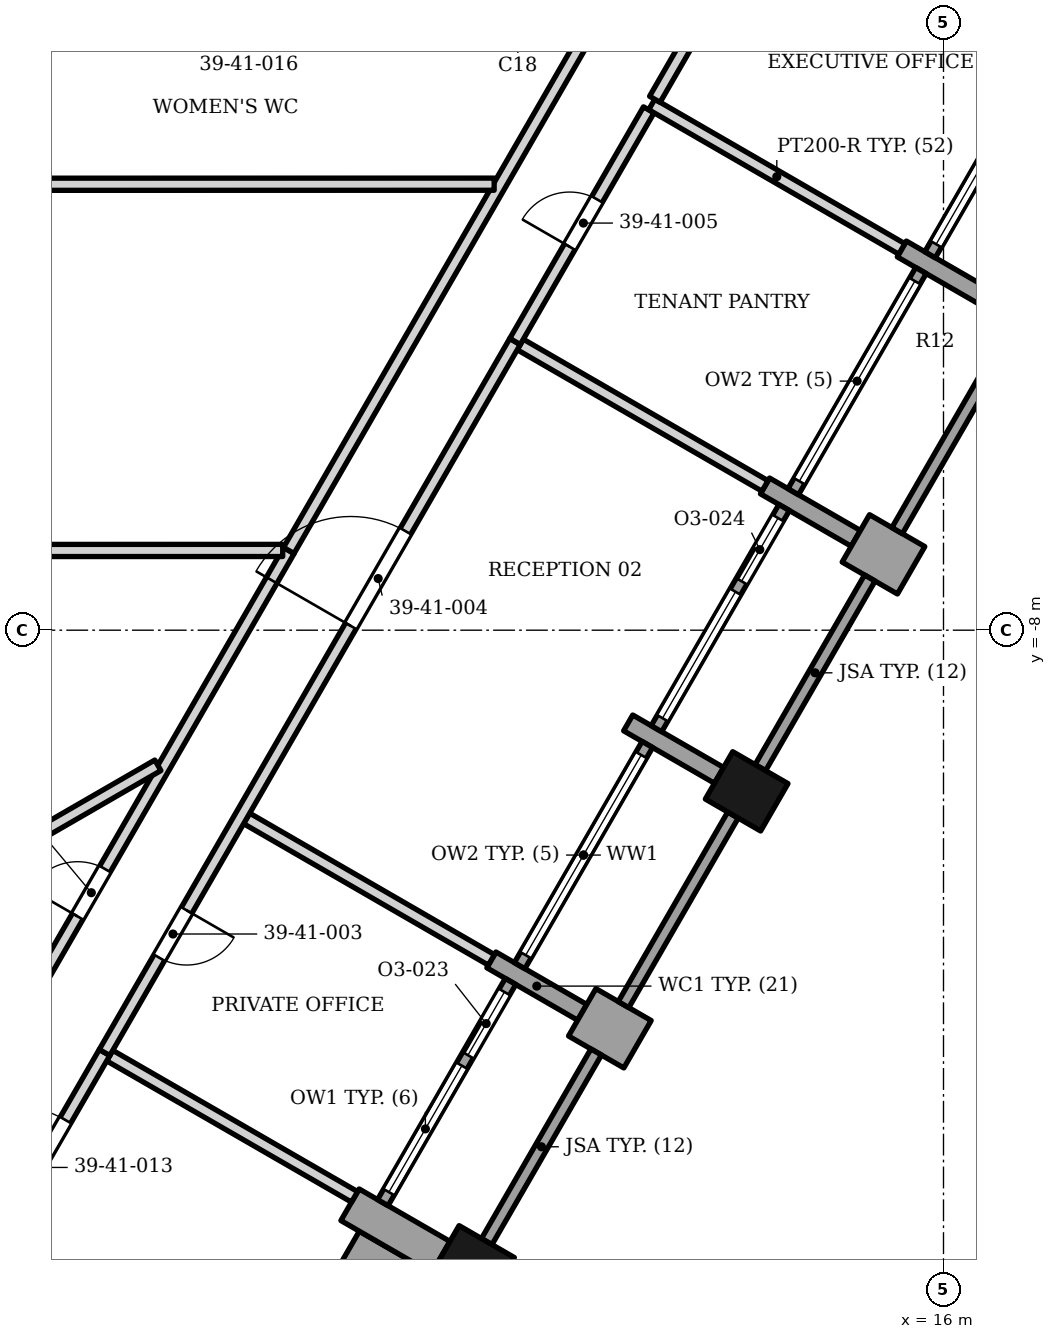
"""IFC4 building model, lengths in metres.
Left out: names, types, materials, properties, quantities, classifications, styles, units other than length and angle.
Written with IfcOpenShell. Run it as: python <this file> out.ifc"""

import sys

from ifc_helpers import new_model, si_unit, direction, frame, frame_2d, origin, origin_2d, place, context, subcontext, project, spatial, rectangle, extrude, element, fill, save


model = new_model("IFC4")
c1 = context("Model", 3, precision=1e-05, world=origin(), true_north=direction((0.0, 1.0)))
c2 = subcontext(c1, "Body", "Model", "MODEL_VIEW")
j1 = project(units=[si_unit("LENGTHUNIT", "METRE"), si_unit("PLANEANGLEUNIT", "RADIAN")], contexts=[c1])
p1 = place(None, origin())
s1 = spatial("IfcSite", under=j1, at=p1, CompositionType="ELEMENT")
p2 = place(p1, origin())
s2 = spatial("IfcBuilding", under=s1, at=p2, CompositionType="ELEMENT")
p3 = place(p2, frame((0.0, 0.0, 168.0)))
s3 = spatial("IfcBuildingStorey", under=s2, at=p3, CompositionType="ELEMENT", Elevation=168.0)
for number, where, z_axis, x_axis in (
    (1, (8.263, -18.444, 0.0), (0.0, 0.0, 1.0), (0.5, 0.866, 0.0)),
    (2, (12.763, -10.65, 0.0), (0.0, 0.0, 1.0), (0.5, 0.866, 0.0)),
):
    element("IfcColumn", number, at=place(p3, frame(where, z_axis=z_axis, x_axis=x_axis)), inside=s3, PredefinedType="COLUMN", context=c2, shape_type="SweptSolid", body=[
        extrude(rectangle(XDim=0.9, YDim=1.05, at=origin_2d()), origin(), (0.0, 0.0, 1.0), 3.9),
    ])
p4 = place(p3, frame((7.733, -18.311, 0.0), z_axis=(0.0, 0.0, 1.0), x_axis=(-0.866013532718, 0.500020560727, 0.0)))
e3 = element("IfcWall", 3, at=p4, inside=s3, PredefinedType="SOLIDWALL", context=c2, shape_type="SweptSolid", body=[
    extrude(rectangle(XDim=1.725, YDim=0.6, at=frame_2d((0.863, 0.0))), origin(), (0.0, 0.0, 1.0), 3.0),
])
p5 = place(p3, frame((10.968, -14.809, 0.0), z_axis=(0.0, 0.0, 1.0), x_axis=(-0.866030680601, 0.499990860175, 0.0)))
e4 = element("IfcWall", 4, at=p5, inside=s3, PredefinedType="SOLIDWALL", context=c2, shape_type="SweptSolid", body=[
    extrude(rectangle(XDim=1.05, YDim=0.9, at=frame_2d((0.525, 0.0))), origin(), (0.0, 0.0, 1.0), 3.0),
])
p6 = place(p3, frame((10.058, -14.284, 0.0), z_axis=(0.0, 0.0, 1.0), x_axis=(-0.866013532718, 0.500020560727, 0.0)))
e5 = element("IfcWall", 5, at=p6, inside=s3, PredefinedType="SOLIDWALL", context=c2, shape_type="SweptSolid", body=[
    extrude(rectangle(XDim=1.725, YDim=0.3, at=frame_2d((0.863, 0.0))), origin(), (0.0, 0.0, 1.0), 3.0),
])
p7 = place(p3, frame((12.308, -10.387, 0.0), z_axis=(0.0, 0.0, 1.0), x_axis=(-0.866074815912, 0.499914405916, 0.0)))
e6 = element("IfcWall", 6, at=p7, inside=s3, PredefinedType="SOLIDWALL", context=c2, shape_type="SweptSolid", body=[
    extrude(rectangle(XDim=1.725, YDim=0.3, at=frame_2d((0.862, 0.0))), origin(), (0.0, 0.0, 1.0), 3.0),
])
p8 = place(p3, frame((15.468, -7.015, 0.0), z_axis=(0.0, 0.0, 1.0), x_axis=(-0.866030680601, 0.499990860175, 0.0)))
e7 = element("IfcWall", 7, at=p8, inside=s3, PredefinedType="SOLIDWALL", context=c2, shape_type="SweptSolid", body=[
    extrude(rectangle(XDim=1.05, YDim=0.9, at=frame_2d((0.525, 0.0))), origin(), (0.0, 0.0, 1.0), 3.0),
])
p9 = place(p3, frame((14.558, -6.49, 0.0), z_axis=(0.0, 0.0, 1.0), x_axis=(-0.866013532718, 0.500020560727, 0.0)))
e8 = element("IfcWall", 8, at=p9, inside=s3, PredefinedType="SOLIDWALL", context=c2, shape_type="SweptSolid", body=[
    extrude(rectangle(XDim=1.725, YDim=0.3, at=frame_2d((0.863, 0.0))), origin(), (0.0, 0.0, 1.0), 3.0),
])
p10 = place(p3, frame((16.807, -2.592, 0.0), z_axis=(0.0, 0.0, 1.0), x_axis=(-0.865994550583, 0.500053435504, 0.0)))
e9 = element("IfcWall", 9, at=p10, inside=s3, PredefinedType="SOLIDWALL", context=c2, shape_type="SweptSolid", body=[
    extrude(rectangle(XDim=1.724, YDim=0.3, at=frame_2d((0.862, 0.0))), origin(), (0.0, 0.0, 1.0), 3.0),
])
p11 = place(p3, frame((8.488, -18.054, 0.0), z_axis=(0.0, 0.0, 1.0), x_axis=(0.500012057535, 0.866018442252, 0.0)))
e10 = element("IfcWall", 10, at=p11, inside=s3, PredefinedType="SOLIDWALL", context=c2, shape_type="SweptSolid", body=[
    extrude(rectangle(XDim=3.6, YDim=0.2, at=frame_2d((1.8, 0.0))), origin(), (0.0, 0.0, 1.0), 3.0),
])
p12 = place(p3, frame((6.779, -17.414, 0.0), z_axis=(0.0, 0.0, 1.0), x_axis=(0.500027713859, 0.866009402589, 0.0)))
e11 = element("IfcWall", 11, at=p12, inside=s3, PredefinedType="ELEMENTEDWALL", context=c2, shape_type="SweptSolid", body=[
    extrude(rectangle(XDim=4.2, YDim=0.2, at=frame_2d((2.1, 0.0))), origin(), (0.0, 0.0, 1.0), 3.0),
])
p13 = place(p12, frame((0.2, 0.0, 0.45)))
e12 = element("IfcOpeningElement", 12, at=p13, cuts=e11, PredefinedType="OPENING", context=c2, shape_type="SweptSolid", body=[
    extrude(rectangle(XDim=2.4, YDim=2.25, at=frame_2d((1.2, 1.125))), frame((0.0, 0.11, 0.0), z_axis=(0.0, -1.0, 0.0), x_axis=(1.0, 0.0, 0.0)), (0.0, 0.0, 1.0), 0.22),
])
p14 = place(p12, frame((2.8, 0.0, 0.0)))
e13 = element("IfcOpeningElement", 13, at=p14, cuts=e11, PredefinedType="OPENING", context=c2, shape_type="SweptSolid", body=[
    extrude(rectangle(XDim=1.2, YDim=2.7, at=frame_2d((0.6, 1.35))), frame((0.0, 0.11, 0.0), z_axis=(0.0, -1.0, 0.0), x_axis=(1.0, 0.0, 0.0)), (0.0, 0.0, 1.0), 0.22),
])
p15 = place(p3, frame((10.738, -14.157, 0.0), z_axis=(0.0, 0.0, 1.0), x_axis=(0.500012057535, 0.866018442252, 0.0)))
e14 = element("IfcWall", 14, at=p15, inside=s3, PredefinedType="SOLIDWALL", context=c2, shape_type="SweptSolid", body=[
    extrude(rectangle(XDim=3.6, YDim=0.2, at=frame_2d((1.8, 0.0))), origin(), (0.0, 0.0, 1.0), 3.0),
])
p16 = place(p3, frame((9.029, -13.517, 0.0), z_axis=(0.0, 0.0, 1.0), x_axis=(0.500002543286, 0.866023935413, 0.0)))
e15 = element("IfcWall", 15, at=p16, inside=s3, PredefinedType="ELEMENTEDWALL", context=c2, shape_type="SweptSolid", body=[
    extrude(rectangle(XDim=4.2, YDim=0.2, at=frame_2d((2.1, 0.0))), origin(), (0.0, 0.0, 1.0), 2.95),
])
p17 = place(p16, frame((0.2, 0.0, 0.45)))
e16 = element("IfcOpeningElement", 16, at=p17, cuts=e15, PredefinedType="OPENING", context=c2, shape_type="SweptSolid", body=[
    extrude(rectangle(XDim=3.8, YDim=2.25, at=frame_2d((1.9, 1.125))), frame((0.0, 0.11, 0.0), z_axis=(0.0, -1.0, 0.0), x_axis=(1.0, 0.0, 0.0)), (0.0, 0.0, 1.0), 0.22),
])
p18 = place(p3, frame((12.988, -10.26, 0.0), z_axis=(0.0, 0.0, 1.0), x_axis=(0.500012057535, 0.866018442252, 0.0)))
e17 = element("IfcWall", 17, at=p18, inside=s3, PredefinedType="SOLIDWALL", context=c2, shape_type="SweptSolid", body=[
    extrude(rectangle(XDim=3.6, YDim=0.2, at=frame_2d((1.8, 0.0))), origin(), (0.0, 0.0, 1.0), 3.0),
])
p19 = place(p3, frame((11.279, -9.62, 0.0), z_axis=(0.0, 0.0, 1.0), x_axis=(0.500027713859, 0.866009402589, 0.0)))
e18 = element("IfcWall", 18, at=p19, inside=s3, PredefinedType="ELEMENTEDWALL", context=c2, shape_type="SweptSolid", body=[
    extrude(rectangle(XDim=4.2, YDim=0.2, at=frame_2d((2.1, 0.0))), origin(), (0.0, 0.0, 1.0), 3.0),
])
p20 = place(p19, frame((0.2, 0.0, 0.45)))
e19 = element("IfcOpeningElement", 19, at=p20, cuts=e18, PredefinedType="OPENING", context=c2, shape_type="SweptSolid", body=[
    extrude(rectangle(XDim=2.4, YDim=2.25, at=frame_2d((1.2, 1.125))), frame((0.0, 0.11, 0.0), z_axis=(0.0, -1.0, 0.0), x_axis=(1.0, 0.0, 0.0)), (0.0, 0.0, 1.0), 0.22),
])
p21 = place(p19, frame((2.8, 0.0, 0.0)))
e20 = element("IfcOpeningElement", 20, at=p21, cuts=e18, PredefinedType="OPENING", context=c2, shape_type="SweptSolid", body=[
    extrude(rectangle(XDim=1.2, YDim=2.7, at=frame_2d((0.6, 1.35))), frame((0.0, 0.11, 0.0), z_axis=(0.0, -1.0, 0.0), x_axis=(1.0, 0.0, 0.0)), (0.0, 0.0, 1.0), 0.22),
])
p22 = place(p3, frame((15.238, -6.363, 0.0), z_axis=(0.0, 0.0, 1.0), x_axis=(0.500012057535, 0.866018442252, 0.0)))
e21 = element("IfcWall", 21, at=p22, inside=s3, PredefinedType="SOLIDWALL", context=c2, shape_type="SweptSolid", body=[
    extrude(rectangle(XDim=3.6, YDim=0.2, at=frame_2d((1.8, 0.0))), origin(), (0.0, 0.0, 1.0), 3.0),
])
p23 = place(p3, frame((13.529, -5.722, 0.0), z_axis=(0.0, 0.0, 1.0), x_axis=(0.500027713859, 0.866009402589, 0.0)))
e22 = element("IfcWall", 22, at=p23, inside=s3, PredefinedType="ELEMENTEDWALL", context=c2, shape_type="SweptSolid", body=[
    extrude(rectangle(XDim=4.2, YDim=0.2, at=frame_2d((2.1, 0.0))), origin(), (0.0, 0.0, 1.0), 3.0),
])
p24 = place(p23, frame((0.2, 0.0, 0.45)))
e23 = element("IfcOpeningElement", 23, at=p24, cuts=e22, PredefinedType="OPENING", context=c2, shape_type="SweptSolid", body=[
    extrude(rectangle(XDim=3.8, YDim=2.25, at=frame_2d((1.9, 1.125))), frame((0.0, 0.11, 0.0), z_axis=(0.0, -1.0, 0.0), x_axis=(1.0, 0.0, 0.0)), (0.0, 0.0, 1.0), 0.22),
])
p25 = place(p3, frame((15.779, -1.825, 0.0), z_axis=(0.0, 0.0, 1.0), x_axis=(0.500002543286, 0.866023935413, 0.0)))
e24 = element("IfcWall", 24, at=p25, inside=s3, PredefinedType="ELEMENTEDWALL", context=c2, shape_type="SweptSolid", body=[
    extrude(rectangle(XDim=4.2, YDim=0.2, at=frame_2d((2.1, 0.0))), origin(), (0.0, 0.0, 1.0), 3.0),
])
p26 = place(p25, frame((0.2, 0.0, 0.45)))
e25 = element("IfcOpeningElement", 25, at=p26, cuts=e24, PredefinedType="OPENING", context=c2, shape_type="SweptSolid", body=[
    extrude(rectangle(XDim=2.4, YDim=2.25, at=frame_2d((1.2, 1.125))), frame((0.0, 0.11, 0.0), z_axis=(0.0, -1.0, 0.0), x_axis=(1.0, 0.0, 0.0)), (0.0, 0.0, 1.0), 0.22),
])
p27 = place(p25, frame((2.8, 0.0, 0.0)))
e26 = element("IfcOpeningElement", 26, at=p27, cuts=e24, PredefinedType="OPENING", context=c2, shape_type="SweptSolid", body=[
    extrude(rectangle(XDim=1.2, YDim=2.7, at=frame_2d((0.6, 1.35))), frame((0.0, 0.11, 0.0), z_axis=(0.0, -1.0, 0.0), x_axis=(1.0, 0.0, 0.0)), (0.0, 0.0, 1.0), 0.22),
])
p28 = place(p3, frame((8.213, -19.58, 0.0), z_axis=(0.0, 0.0, 1.0), x_axis=(-0.865997808697, 0.500047793048, 0.0)))
e27 = element("IfcWall", 27, at=p28, inside=s3, PredefinedType="SOLIDWALL", context=c2, shape_type="SweptSolid", body=[
    extrude(rectangle(XDim=2.425, YDim=1.117, at=frame_2d((1.212, 0.0))), origin(), (0.0, 0.0, 1.0), 3.0),
])
p29 = place(p3, frame((2.287, -14.996, 0.0), z_axis=(0.0, 0.0, 1.0), x_axis=(0.866183837695, -0.499725483956, 0.0)))
e28 = element("IfcWall", 28, at=p29, inside=s3, PredefinedType="PARTITIONING", context=c2, shape_type="SweptSolid", body=[
    extrude(rectangle(XDim=4.649, YDim=0.2, at=frame_2d((2.325, 0.0))), origin(), (0.0, 0.0, 1.0), 3.052),
])
p30 = place(p3, frame((0.068, -15.638, 0.0), z_axis=(0.0, 0.0, 1.0), x_axis=(0.499989755964, 0.866031318101, 0.0)))
e29 = element("IfcWall", 29, at=p30, inside=s3, PredefinedType="PARTITIONING", context=c2, shape_type="SweptSolid", body=[
    extrude(rectangle(XDim=10.331, YDim=0.2, at=frame_2d((5.166, 0.0))), origin(), (0.0, 0.0, 1.0), 2.884),
])
p31 = place(p30, frame((3.385, 0.0, 0.0)))
e30 = element("IfcOpeningElement", 30, at=p31, cuts=e29, PredefinedType="OPENING", context=c2, shape_type="SweptSolid", body=[
    extrude(rectangle(XDim=0.9, YDim=2.1, at=frame_2d((0.45, 1.05))), frame((0.0, 0.11, 0.0), z_axis=(0.0, -1.0, 0.0), x_axis=(1.0, 0.0, 0.0)), (0.0, 0.0, 1.0), 0.22),
])
p32 = place(p3, frame((0.018, -18.725, 0.0), z_axis=(0.0, 0.0, 1.0), x_axis=(0.500372623754, 0.865810162448, 0.0)))
e31 = element("IfcWall", 31, at=p32, inside=s3, PredefinedType="PARTITIONING", context=c2, shape_type="SweptSolid", body=[
    extrude(rectangle(XDim=4.366, YDim=0.2, at=frame_2d((2.183, 0.0))), origin(), (0.0, 0.0, 1.0), 3.128),
])
p33 = place(p32, frame((1.283, 0.0, 0.0)))
e32 = element("IfcOpeningElement", 32, at=p33, cuts=e31, PredefinedType="OPENING", context=c2, shape_type="SweptSolid", body=[
    extrude(rectangle(XDim=1.8, YDim=2.4, at=frame_2d((0.9, 1.2))), frame((0.0, 0.11, 0.0), z_axis=(0.0, -1.0, 0.0), x_axis=(1.0, 0.0, 0.0)), (0.0, 0.0, 1.0), 0.22),
])
p34 = place(p3, frame((0.7, -11.596, 0.0), z_axis=(0.0, 0.0, 1.0), x_axis=(0.865997634224, 0.500048095206, 0.0)))
e33 = element("IfcWall", 33, at=p34, inside=s3, PredefinedType="PARTITIONING", context=c2, shape_type="SweptSolid", body=[
    extrude(rectangle(XDim=2.747, YDim=0.2, at=frame_2d((1.374, 0.0))), origin(), (0.0, 0.0, 1.0), 3.73),
])
p35 = place(p3, frame((4.539, -11.095, 0.0), z_axis=(0.0, 0.0, 1.0), x_axis=(0.865854964183, -0.50029509392, 0.0)))
e34 = element("IfcWall", 34, at=p35, inside=s3, PredefinedType="PARTITIONING", context=c2, shape_type="SweptSolid", body=[
    extrude(rectangle(XDim=4.65, YDim=0.2, at=frame_2d((2.325, 0.0))), origin(), (0.0, 0.0, 1.0), 2.884),
])
p36 = place(p3, frame((-5.098, -6.69, 0.0), z_axis=(0.0, 0.0, 1.0), x_axis=(0.99999998975, 0.000143177586, 0.0)))
e35 = element("IfcWall", 35, at=p36, inside=s3, PredefinedType="PARTITIONING", context=c2, shape_type="SweptSolid", body=[
    extrude(rectangle(XDim=10.231, YDim=0.2, at=frame_2d((5.115, 0.0))), origin(), (0.0, 0.0, 1.0), 3.73),
])
p37 = place(p3, frame((5.233, -6.688, 0.0), z_axis=(0.0, 0.0, 1.0), x_axis=(0.499991401208, 0.866030368243, 0.0)))
e36 = element("IfcWall", 36, at=p37, inside=s3, PredefinedType="PARTITIONING", context=c2, shape_type="SweptSolid", body=[
    extrude(rectangle(XDim=11.996, YDim=0.2, at=frame_2d((5.998, 0.0))), origin(), (0.0, 0.0, 1.0), 3.052),
])
p38 = place(p3, frame((9.04, -3.302, 0.0), z_axis=(0.0, 0.0, 1.0), x_axis=(0.865844341998, -0.500313477162, 0.0)))
e37 = element("IfcWall", 37, at=p38, inside=s3, PredefinedType="PARTITIONING", context=c2, shape_type="SweptSolid", body=[
    extrude(rectangle(XDim=4.648, YDim=0.2, at=frame_2d((2.324, 0.0))), origin(), (0.0, 0.0, 1.0), 3.052),
])
p39 = place(p3, frame((2.202, -14.945, 0.0), z_axis=(0.0, 0.0, 1.0), x_axis=(0.499997969693, 0.866026575979, 0.0)))
e38 = element("IfcWall", 38, at=p39, inside=s3, PredefinedType="PARTITIONING", context=c2, shape_type="SweptSolid", body=[
    extrude(rectangle(XDim=13.5, YDim=0.2, at=frame_2d((6.75, 0.0))), origin(), (0.0, 0.0, 1.0), 2.884),
])
p40 = place(p39, frame((1.8, 0.0, 0.0)))
e39 = element("IfcOpeningElement", 39, at=p40, cuts=e38, PredefinedType="OPENING", context=c2, shape_type="SweptSolid", body=[
    extrude(rectangle(XDim=0.9, YDim=2.1, at=frame_2d((0.45, 1.05))), frame((0.0, 0.11, 0.0), z_axis=(0.0, -1.0, 0.0), x_axis=(1.0, 0.0, 0.0)), (0.0, 0.0, 1.0), 0.22),
])
p41 = place(p39, frame((8.1, 0.0, 0.0)))
e40 = element("IfcOpeningElement", 40, at=p41, cuts=e38, PredefinedType="OPENING", context=c2, shape_type="SweptSolid", body=[
    extrude(rectangle(XDim=1.8, YDim=2.4, at=frame_2d((0.9, 1.2))), frame((0.0, 0.11, 0.0), z_axis=(0.0, -1.0, 0.0), x_axis=(1.0, 0.0, 0.0)), (0.0, 0.0, 1.0), 0.22),
])
p42 = place(p3, frame((-0.982, -0.667, 0.0), z_axis=(0.0, 0.0, 1.0), x_axis=(0.999999988339, 0.000152714498, 0.0)))
e41 = element("IfcWall", 41, at=p42, inside=s3, PredefinedType="PARTITIONING", context=c2, shape_type="SweptSolid", body=[
    extrude(rectangle(XDim=9.592, YDim=0.2, at=frame_2d((4.796, 0.0))), origin(), (0.0, 0.0, 1.0), 3.73),
])
p43 = place(p3, frame((8.954, -3.252, 0.0), z_axis=(0.0, 0.0, 1.0), x_axis=(0.499989943423, 0.866031209874, 0.0)))
e42 = element("IfcWall", 42, at=p43, inside=s3, PredefinedType="PARTITIONING", context=c2, shape_type="SweptSolid", body=[
    extrude(rectangle(XDim=4.398, YDim=0.2, at=frame_2d((2.199, 0.0))), origin(), (0.0, 0.0, 1.0), 3.052),
])
p44 = place(p43, frame((1.798, 0.0, 0.0)))
e43 = element("IfcOpeningElement", 43, at=p44, cuts=e42, PredefinedType="OPENING", context=c2, shape_type="SweptSolid", body=[
    extrude(rectangle(XDim=0.9, YDim=2.1, at=frame_2d((0.45, 1.05))), frame((0.0, 0.11, 0.0), z_axis=(0.0, -1.0, 0.0), x_axis=(1.0, 0.0, 0.0)), (0.0, 0.0, 1.0), 0.22),
])
p45 = place(p3, frame((11.202, 0.646, 0.0), z_axis=(0.0, 0.0, 1.0), x_axis=(0.865857651242, -0.500290443428, 0.0)))
e44 = element("IfcWall", 44, at=p45, inside=s3, PredefinedType="PARTITIONING", context=c2, shape_type="SweptSolid", body=[
    extrude(rectangle(XDim=4.75, YDim=0.2, at=frame_2d((2.375, 0.0))), origin(), (0.0, 0.0, 1.0), 3.052),
])
p46 = place(p3, frame((11.253, 0.731, 0.0), z_axis=(0.0, 0.0, 1.0), x_axis=(0.499648448578, 0.866228276976, 0.0)))
e45 = element("IfcWall", 45, at=p46, inside=s3, PredefinedType="PARTITIONING", context=c2, shape_type="SweptSolid", body=[
    extrude(rectangle(XDim=3.427, YDim=0.2, at=frame_2d((1.714, 0.0))), origin(), (0.0, 0.0, 1.0), 3.73),
])
p47 = place(p46, frame((1.164, 0.0, 0.0)))
e46 = element("IfcOpeningElement", 46, at=p47, cuts=e45, PredefinedType="OPENING", context=c2, shape_type="SweptSolid", body=[
    extrude(rectangle(XDim=1.0, YDim=2.4, at=frame_2d((0.5, 1.2))), frame((0.0, 0.11, 0.0), z_axis=(0.0, -1.0, 0.0), x_axis=(1.0, 0.0, 0.0)), (0.0, 0.0, 1.0), 0.22),
])
p48 = place(p13, origin())
e47 = element("IfcWindow", 47, at=p48, inside=s3, PartitioningType="SINGLE_PANEL", PredefinedType="WINDOW", context=c2, shape_type="SweptSolid", body=[
    extrude(rectangle(XDim=2.4, YDim=2.25, at=frame_2d((1.2, 1.125))), frame((0.0, 0.03, 0.0), z_axis=(0.0, -1.0, 0.0), x_axis=(1.0, 0.0, 0.0)), (0.0, 0.0, 1.0), 0.06),
])
fill(e12, e47)
p49 = place(p14, origin())
e48 = element("IfcDoor", 48, at=p49, inside=s3, OperationType="SINGLE_SWING_LEFT", PredefinedType="DOOR", context=c2, shape_type="SweptSolid", body=[
    extrude(rectangle(XDim=1.2, YDim=2.7, at=frame_2d((0.6, 1.35))), frame((0.0, 0.025, 0.0), z_axis=(0.0, -1.0, 0.0), x_axis=(1.0, 0.0, 0.0)), (0.0, 0.0, 1.0), 0.05),
])
fill(e13, e48)
p50 = place(p17, origin())
e49 = element("IfcWindow", 49, at=p50, inside=s3, PartitioningType="SINGLE_PANEL", PredefinedType="WINDOW", context=c2, shape_type="SweptSolid", body=[
    extrude(rectangle(XDim=3.8, YDim=2.25, at=frame_2d((1.9, 1.125))), frame((0.0, 0.03, 0.0), z_axis=(0.0, -1.0, 0.0), x_axis=(1.0, 0.0, 0.0)), (0.0, 0.0, 1.0), 0.06),
])
fill(e16, e49)
p51 = place(p20, origin())
e50 = element("IfcWindow", 50, at=p51, inside=s3, PartitioningType="SINGLE_PANEL", PredefinedType="WINDOW", context=c2, shape_type="SweptSolid", body=[
    extrude(rectangle(XDim=2.4, YDim=2.25, at=frame_2d((1.2, 1.125))), frame((0.0, 0.03, 0.0), z_axis=(0.0, -1.0, 0.0), x_axis=(1.0, 0.0, 0.0)), (0.0, 0.0, 1.0), 0.06),
])
fill(e19, e50)
p52 = place(p21, origin())
e51 = element("IfcDoor", 51, at=p52, inside=s3, OperationType="SINGLE_SWING_LEFT", PredefinedType="DOOR", context=c2, shape_type="SweptSolid", body=[
    extrude(rectangle(XDim=1.2, YDim=2.7, at=frame_2d((0.6, 1.35))), frame((0.0, 0.025, 0.0), z_axis=(0.0, -1.0, 0.0), x_axis=(1.0, 0.0, 0.0)), (0.0, 0.0, 1.0), 0.05),
])
fill(e20, e51)
p53 = place(p24, origin())
e52 = element("IfcWindow", 52, at=p53, inside=s3, PartitioningType="SINGLE_PANEL", PredefinedType="WINDOW", context=c2, shape_type="SweptSolid", body=[
    extrude(rectangle(XDim=3.8, YDim=2.25, at=frame_2d((1.9, 1.125))), frame((0.0, 0.03, 0.0), z_axis=(0.0, -1.0, 0.0), x_axis=(1.0, 0.0, 0.0)), (0.0, 0.0, 1.0), 0.06),
])
fill(e23, e52)
p54 = place(p26, origin())
e53 = element("IfcWindow", 53, at=p54, inside=s3, PartitioningType="SINGLE_PANEL", PredefinedType="WINDOW", context=c2, shape_type="SweptSolid", body=[
    extrude(rectangle(XDim=2.4, YDim=2.25, at=frame_2d((1.2, 1.125))), frame((0.0, 0.03, 0.0), z_axis=(0.0, -1.0, 0.0), x_axis=(1.0, 0.0, 0.0)), (0.0, 0.0, 1.0), 0.06),
])
fill(e25, e53)
p55 = place(p40, origin())
e54 = element("IfcDoor", 54, at=p55, inside=s3, OperationType="SINGLE_SWING_RIGHT", PredefinedType="DOOR", context=c2, shape_type="SweptSolid", body=[
    extrude(rectangle(XDim=0.9, YDim=2.1, at=frame_2d((0.45, 1.05))), frame((0.0, 0.025, 0.0), z_axis=(0.0, -1.0, 0.0), x_axis=(1.0, 0.0, 0.0)), (0.0, 0.0, 1.0), 0.05),
])
fill(e39, e54)
p56 = place(p41, origin())
e55 = element("IfcDoor", 55, at=p56, inside=s3, OperationType="DOUBLE_DOOR_SINGLE_SWING", PredefinedType="DOOR", context=c2, shape_type="SweptSolid", body=[
    extrude(rectangle(XDim=1.8, YDim=2.4, at=frame_2d((0.9, 1.2))), frame((0.0, 0.025, 0.0), z_axis=(0.0, -1.0, 0.0), x_axis=(1.0, 0.0, 0.0)), (0.0, 0.0, 1.0), 0.05),
])
fill(e40, e55)
p57 = place(p44, origin())
e56 = element("IfcDoor", 56, at=p57, inside=s3, OperationType="SINGLE_SWING_LEFT", PredefinedType="DOOR", context=c2, shape_type="SweptSolid", body=[
    extrude(rectangle(XDim=0.9, YDim=2.1, at=frame_2d((0.45, 1.05))), frame((0.0, 0.025, 0.0), z_axis=(0.0, -1.0, 0.0), x_axis=(1.0, 0.0, 0.0)), (0.0, 0.0, 1.0), 0.05),
])
fill(e43, e56)
p58 = place(p31, origin())
e57 = element("IfcDoor", 57, at=p58, inside=s3, OperationType="SINGLE_SWING_LEFT", PredefinedType="DOOR", context=c2, shape_type="SweptSolid", body=[
    extrude(rectangle(XDim=0.9, YDim=2.1, at=frame_2d((0.45, 1.05))), frame((0.0, 0.025, 0.0), z_axis=(0.0, -1.0, 0.0), x_axis=(1.0, 0.0, 0.0)), (0.0, 0.0, 1.0), 0.05),
])
fill(e30, e57)
p59 = place(p33, origin())
e58 = element("IfcDoor", 58, at=p59, inside=s3, OperationType="DOUBLE_DOOR_SINGLE_SWING", PredefinedType="DOOR", context=c2, shape_type="SweptSolid", body=[
    extrude(rectangle(XDim=1.8, YDim=2.4, at=frame_2d((0.9, 1.2))), frame((0.0, 0.025, 0.0), z_axis=(0.0, -1.0, 0.0), x_axis=(1.0, 0.0, 0.0)), (0.0, 0.0, 1.0), 0.05),
])
fill(e32, e58)
save(model, sys.argv[1])
